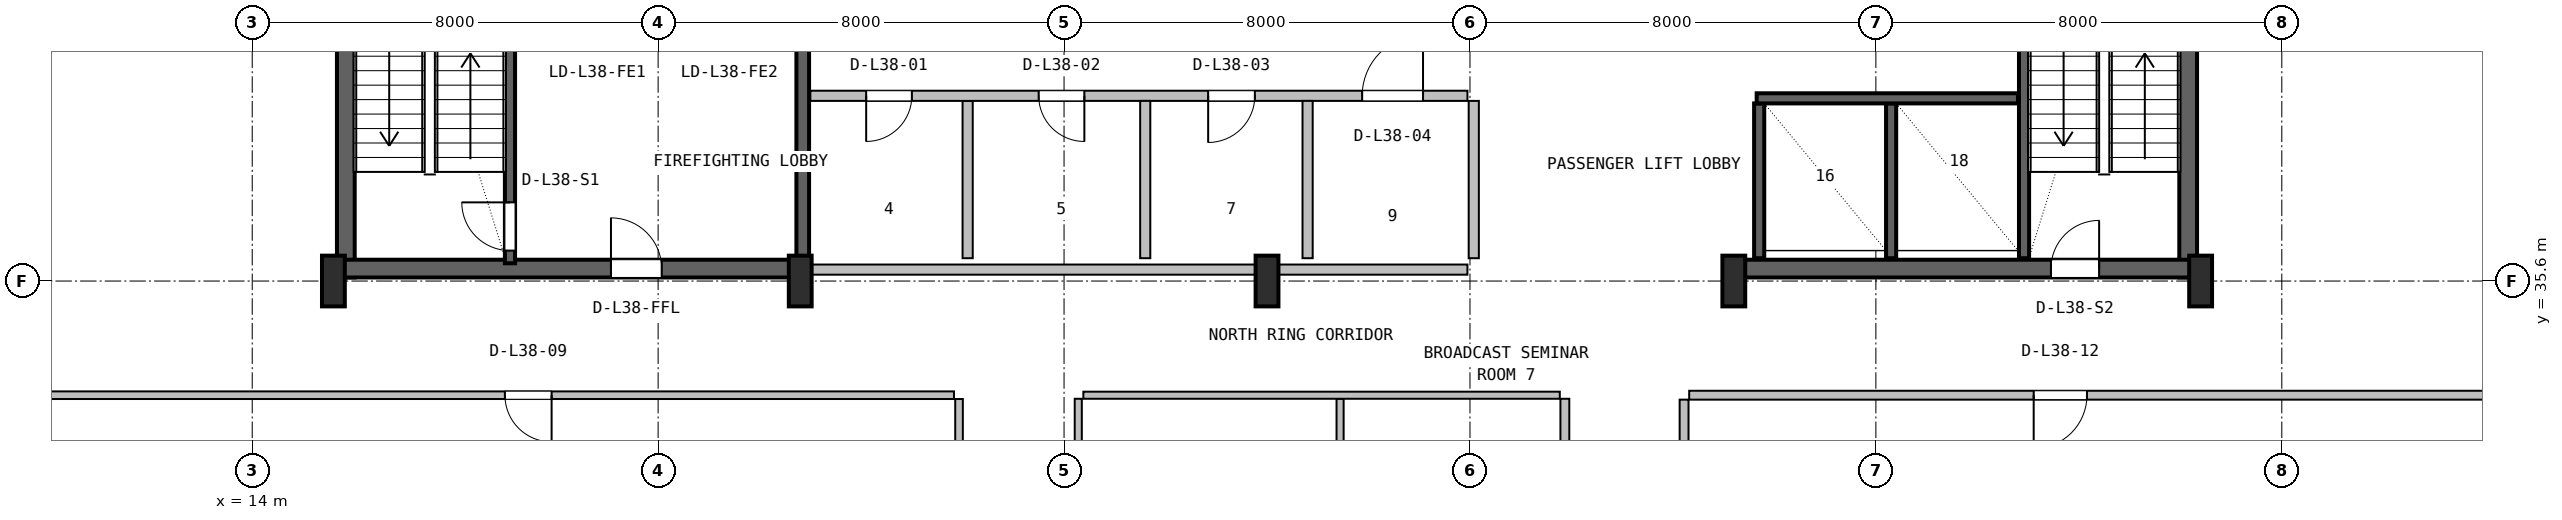
"""IFC4 building model, lengths in metres.
Left out: names, types, materials, properties, quantities, classifications, styles, units other than length and angle.
Written with IfcOpenShell. Run it as: python <this file> out.ifc"""

import sys

from ifc_helpers import new_model, si_unit, direction, frame, frame_2d, origin, origin_2d, place, context, subcontext, project, spatial, rectangle, i_section, extrude, source, transform, mapped, element, fill, save


model = new_model("IFC4")
c1 = context("Model", 3, precision=1e-05, world=origin(), true_north=direction((0.0, 1.0)))
c2 = subcontext(c1, "Body", "Model", "MODEL_VIEW")
j1 = project(units=[si_unit("LENGTHUNIT", "METRE"), si_unit("PLANEANGLEUNIT", "RADIAN")], contexts=[c1])
p1 = place(None, origin())
s1 = spatial("IfcSite", under=j1, at=p1, CompositionType="ELEMENT")
p2 = place(p1, origin())
s2 = spatial("IfcBuilding", under=s1, at=p2, CompositionType="ELEMENT")
p3 = place(p2, frame((0.0, 0.0, 157.2)))
s3 = spatial("IfcBuildingStorey", under=s2, at=p3, CompositionType="ELEMENT", Elevation=157.2)
for number, where, z_axis, x_axis in (
    (1, (15.845, 35.67, 0.0), (0.0, 0.0, 1.0), (0.0, 1.0, 0.0)),
    (2, (52.155, 35.67, 0.0), (0.0, 0.0, 1.0), (0.0, 1.0, 0.0)),
):
    element("IfcWall", number, at=place(p3, frame(where, z_axis=z_axis, x_axis=x_axis)), inside=s3, PredefinedType="SHEAR", context=c2, shape_type="SweptSolid", body=[
        extrude(rectangle(XDim=11.13, YDim=0.35, at=frame_2d((5.565, 0.0))), origin(), (0.0, 0.0, 1.0), 3.55),
    ])
p4 = place(p3, frame((15.67, 35.845, 0.0), z_axis=(0.0, 0.0, 1.0), x_axis=(1.0, 0.0, 0.0)))
e3 = element("IfcWall", 3, at=p4, inside=s3, PredefinedType="SHEAR", context=c2, shape_type="SweptSolid", body=[
    extrude(rectangle(XDim=9.13, YDim=0.35, at=frame_2d((4.565, 0.0))), origin(), (0.0, 0.0, 1.0), 3.55),
])
p5 = place(p4, frame((5.4, 0.0, 0.0)))
e4 = element("IfcOpeningElement", 4, at=p5, cuts=e3, PredefinedType="OPENING", context=c2, shape_type="SweptSolid", body=[
    extrude(rectangle(XDim=1.0, YDim=2.1, at=frame_2d((0.5, 1.05))), frame((0.0, 0.185, 0.0), z_axis=(0.0, -1.0, 0.0), x_axis=(1.0, 0.0, 0.0)), (0.0, 0.0, 1.0), 0.37),
])
p6 = place(p3, frame((43.2, 35.845, 0.0), z_axis=(0.0, 0.0, 1.0), x_axis=(1.0, 0.0, 0.0)))
e5 = element("IfcWall", 5, at=p6, inside=s3, PredefinedType="SHEAR", context=c2, shape_type="SweptSolid", body=[
    extrude(rectangle(XDim=9.13, YDim=0.35, at=frame_2d((4.565, 0.0))), origin(), (0.0, 0.0, 1.0), 3.55),
])
p7 = place(p6, frame((6.25, 0.0, 0.0)))
e6 = element("IfcOpeningElement", 6, at=p7, cuts=e5, PredefinedType="OPENING", context=c2, shape_type="SweptSolid", body=[
    extrude(rectangle(XDim=0.95, YDim=2.1, at=frame_2d((0.475, 1.05))), frame((0.0, 0.185, 0.0), z_axis=(0.0, -1.0, 0.0), x_axis=(1.0, 0.0, 0.0)), (0.0, 0.0, 1.0), 0.37),
])
m1 = source(origin(), c2, "Body", "SweptSolid", [
    extrude(i_section(OverallWidth=0.45, OverallDepth=1.0, WebThickness=0.016, FlangeThickness=0.03, FilletRadius=0.016, at=origin_2d()), origin(), (0.0, 0.0, 1.0), 3.8),
])
for number, where, z_axis, x_axis in (
    (7, (15.6, 35.6, 0.0), (0.0, 0.0, 1.0), (1.0, 0.0, 0.0)),
    (8, (24.8, 35.6, 0.0), (0.0, 0.0, 1.0), (1.0, 0.0, 0.0)),
    (9, (34.0, 35.6, 0.0), (0.0, 0.0, 1.0), (1.0, 0.0, 0.0)),
    (10, (43.2, 35.6, 0.0), (0.0, 0.0, 1.0), (1.0, 0.0, 0.0)),
    (11, (52.4, 35.6, 0.0), (0.0, 0.0, 1.0), (1.0, 0.0, 0.0)),
):
    element("IfcColumn", number, at=place(p3, frame(where, z_axis=z_axis, x_axis=x_axis)), inside=s3, PredefinedType="COLUMN", context=c2, shape_type="MappedRepresentation", body=[
        mapped(m1, transform((0.0, 0.0, 0.0), x_axis=(1.0, 0.0, 0.0), y_axis=(0.0, 1.0, 0.0), z_axis=(0.0, 0.0, 1.0), scale=1.0)),
    ])
p8 = place(p3, frame((19.08, 35.95, 0.0), z_axis=(0.0, 0.0, 1.0), x_axis=(0.0, 1.0, 0.0)))
e12 = element("IfcWall", 12, at=p8, inside=s3, PredefinedType="SHEAR", context=c2, shape_type="SweptSolid", body=[
    extrude(rectangle(XDim=9.65, YDim=0.2, at=frame_2d((4.825, 0.0))), origin(), (0.0, 0.0, 1.0), 3.55),
])
p9 = place(p8, frame((0.25, 0.0, 0.0)))
e13 = element("IfcOpeningElement", 13, at=p9, cuts=e12, PredefinedType="OPENING", context=c2, shape_type="SweptSolid", body=[
    extrude(rectangle(XDim=0.95, YDim=2.1, at=frame_2d((0.475, 1.05))), frame((0.0, 0.11, 0.0), z_axis=(0.0, -1.0, 0.0), x_axis=(1.0, 0.0, 0.0)), (0.0, 0.0, 1.0), 0.22),
])
p10 = place(p3, frame((24.85, 36.05, 0.0), z_axis=(0.0, 0.0, 1.0), x_axis=(0.0, 1.0, 0.0)))
e14 = element("IfcWall", 14, at=p10, inside=s3, PredefinedType="SHEAR", context=c2, shape_type="SweptSolid", body=[
    extrude(rectangle(XDim=10.45, YDim=0.25, at=frame_2d((5.225, 0.0))), origin(), (0.0, 0.0, 1.0), 3.55),
])
p11 = place(p3, frame((48.92, 36.05, 0.0), z_axis=(0.0, 0.0, 1.0), x_axis=(0.0, 1.0, 0.0)))
e15 = element("IfcWall", 15, at=p11, inside=s3, PredefinedType="SHEAR", context=c2, shape_type="SweptSolid", body=[
    extrude(rectangle(XDim=10.5, YDim=0.2, at=frame_2d((5.25, 0.0))), origin(), (0.0, 0.0, 1.0), 3.55),
])
for number, where, z_axis, x_axis in (
    (16, (43.7, 36.05, 0.0), (0.0, 0.0, 1.0), (0.0, 1.0, 0.0)),
    (17, (46.3, 36.05, 0.0), (0.0, 0.0, 1.0), (0.0, 1.0, 0.0)),
):
    element("IfcWall", number, at=place(p3, frame(where, z_axis=z_axis, x_axis=x_axis)), inside=s3, PredefinedType="SHEAR", context=c2, shape_type="SweptSolid", body=[
        extrude(rectangle(XDim=3.05, YDim=0.2, at=frame_2d((1.525, 0.0))), origin(), (0.0, 0.0, 1.0), 3.55),
    ])
p12 = place(p3, frame((43.65, 39.2, 0.0), z_axis=(0.0, 0.0, 1.0), x_axis=(1.0, 0.0, 0.0)))
e18 = element("IfcWall", 18, at=p12, inside=s3, PredefinedType="SHEAR", context=c2, shape_type="SweptSolid", body=[
    extrude(rectangle(XDim=5.15, YDim=0.2, at=frame_2d((2.575, 0.0))), origin(), (0.0, 0.0, 1.0), 3.55),
])
p13 = place(p3, frame((25.0, 35.825, 0.0), z_axis=(0.0, 0.0, 1.0), x_axis=(1.0, 0.0, 0.0)))
e19 = element("IfcWall", 19, at=p13, inside=s3, PredefinedType="SOLIDWALL", context=c2, shape_type="SweptSolid", body=[
    extrude(rectangle(XDim=12.95, YDim=0.2, at=frame_2d((6.475, 0.0))), origin(), (0.0, 0.0, 1.0), 2.575),
])
p14 = place(p3, frame((28.1, 36.05, 0.0), z_axis=(0.0, 0.0, 1.0), x_axis=(0.0, 1.0, 0.0)))
e20 = element("IfcWall", 20, at=p14, inside=s3, PredefinedType="PLUMBINGWALL", context=c2, shape_type="SweptSolid", body=[
    extrude(rectangle(XDim=3.1, YDim=0.2, at=frame_2d((1.55, 0.0))), origin(), (0.0, 0.0, 1.0), 3.53),
])
p15 = place(p3, frame((25.0, 39.25, 0.0), z_axis=(0.0, 0.0, 1.0), x_axis=(1.0, 0.0, 0.0)))
e21 = element("IfcWall", 21, at=p15, inside=s3, PredefinedType="SOLIDWALL", context=c2, shape_type="SweptSolid", body=[
    extrude(rectangle(XDim=12.95, YDim=0.2, at=frame_2d((6.475, 0.0))), origin(), (0.0, 0.0, 1.0), 3.53),
])
p16 = place(p15, frame((1.1, 0.0, 0.0)))
e22 = element("IfcOpeningElement", 22, at=p16, cuts=e21, PredefinedType="OPENING", context=c2, shape_type="SweptSolid", body=[
    extrude(rectangle(XDim=0.9, YDim=2.06, at=frame_2d((0.45, 1.03))), frame((0.0, 0.11, 0.0), z_axis=(0.0, -1.0, 0.0), x_axis=(1.0, 0.0, 0.0)), (0.0, 0.0, 1.0), 0.22),
])
p17 = place(p15, frame((4.5, 0.0, 0.0)))
e23 = element("IfcOpeningElement", 23, at=p17, cuts=e21, PredefinedType="OPENING", context=c2, shape_type="SweptSolid", body=[
    extrude(rectangle(XDim=0.9, YDim=2.06, at=frame_2d((0.45, 1.03))), frame((0.0, 0.11, 0.0), z_axis=(0.0, -1.0, 0.0), x_axis=(1.0, 0.0, 0.0)), (0.0, 0.0, 1.0), 0.22),
])
p18 = place(p15, frame((7.84, 0.0, 0.0)))
e24 = element("IfcOpeningElement", 24, at=p18, cuts=e21, PredefinedType="OPENING", context=c2, shape_type="SweptSolid", body=[
    extrude(rectangle(XDim=0.92, YDim=2.08, at=frame_2d((0.46, 1.04))), frame((0.0, 0.11, 0.0), z_axis=(0.0, -1.0, 0.0), x_axis=(1.0, 0.0, 0.0)), (0.0, 0.0, 1.0), 0.22),
])
p19 = place(p15, frame((10.875, 0.0, 0.0)))
e25 = element("IfcOpeningElement", 25, at=p19, cuts=e21, PredefinedType="OPENING", context=c2, shape_type="SweptSolid", body=[
    extrude(rectangle(XDim=1.2, YDim=2.1, at=frame_2d((0.6, 1.05))), frame((0.0, 0.11, 0.0), z_axis=(0.0, -1.0, 0.0), x_axis=(1.0, 0.0, 0.0)), (0.0, 0.0, 1.0), 0.22),
])
p20 = place(p3, frame((31.6, 36.05, 0.0), z_axis=(0.0, 0.0, 1.0), x_axis=(0.0, 1.0, 0.0)))
e26 = element("IfcWall", 26, at=p20, inside=s3, PredefinedType="PLUMBINGWALL", context=c2, shape_type="SweptSolid", body=[
    extrude(rectangle(XDim=3.1, YDim=0.2, at=frame_2d((1.55, 0.0))), origin(), (0.0, 0.0, 1.0), 3.53),
])
for number, where, z_axis, x_axis in (
    (27, (34.8, 36.05, 0.0), (0.0, 0.0, 1.0), (0.0, 1.0, 0.0)),
    (28, (38.075, 36.05, 0.0), (0.0, 0.0, 1.0), (0.0, 1.0, 0.0)),
):
    element("IfcWall", number, at=place(p3, frame(where, z_axis=z_axis, x_axis=x_axis)), inside=s3, PredefinedType="SOLIDWALL", context=c2, shape_type="SweptSolid", body=[
        extrude(rectangle(XDim=3.1, YDim=0.2, at=frame_2d((1.55, 0.0))), origin(), (0.0, 0.0, 1.0), 3.53),
    ])
p21 = place(p3, frame((27.93, 26.647, 0.0), z_axis=(0.0, 0.0, 1.0), x_axis=(0.0, 1.0, 0.0)))
e29 = element("IfcWall", 29, at=p21, inside=s3, PredefinedType="PARTITIONING", context=c2, shape_type="SweptSolid", body=[
    extrude(rectangle(XDim=6.628, YDim=0.15, at=frame_2d((3.314, 0.0))), origin(), (0.0, 0.0, 1.0), 3.222),
])
p22 = place(p3, frame((7.18, 33.35, 0.0), z_axis=(0.0, 0.0, 1.0), x_axis=(1.0, 0.0, 0.0)))
e30 = element("IfcWall", 30, at=p22, inside=s3, PredefinedType="PARTITIONING", context=c2, shape_type="SweptSolid", body=[
    extrude(rectangle(XDim=20.65, YDim=0.15, at=frame_2d((10.325, 0.0))), origin(), (0.0, 0.0, 1.0), 2.909),
])
p23 = place(p22, frame((11.8, 0.0, 0.0)))
e31 = element("IfcOpeningElement", 31, at=p23, cuts=e30, PredefinedType="OPENING", context=c2, shape_type="SweptSolid", body=[
    extrude(rectangle(XDim=0.92, YDim=2.08, at=frame_2d((0.46, 1.04))), frame((0.0, 0.085, 0.0), z_axis=(0.0, -1.0, 0.0), x_axis=(1.0, 0.0, 0.0)), (0.0, 0.0, 1.0), 0.17),
])
p24 = place(p3, frame((35.44, 28.98, 0.0), z_axis=(0.0, 0.0, 1.0), x_axis=(0.0, 1.0, 0.0)))
e32 = element("IfcWall", 32, at=p24, inside=s3, PredefinedType="PARTITIONING", context=c2, shape_type="SweptSolid", body=[
    extrude(rectangle(XDim=4.3, YDim=0.14, at=frame_2d((2.15, 0.0))), origin(), (0.0, 0.0, 1.0), 3.222),
])
p25 = place(p3, frame((30.38, 33.35, 0.0), z_axis=(0.0, 0.0, 1.0), x_axis=(1.0, 0.0, 0.0)))
e33 = element("IfcWall", 33, at=p25, inside=s3, PredefinedType="PARTITIONING", context=c2, shape_type="SweptSolid", body=[
    extrude(rectangle(XDim=9.39, YDim=0.14, at=frame_2d((4.695, 0.0))), origin(), (0.0, 0.0, 1.0), 2.909),
])
p26 = place(p3, frame((30.28, 28.98, 0.0), z_axis=(0.0, 0.0, 1.0), x_axis=(0.0, 1.0, 0.0)))
e34 = element("IfcWall", 34, at=p26, inside=s3, PredefinedType="PARTITIONING", context=c2, shape_type="SweptSolid", body=[
    extrude(rectangle(XDim=4.3, YDim=0.14, at=frame_2d((2.15, 0.0))), origin(), (0.0, 0.0, 1.0), 3.222),
])
p27 = place(p3, frame((39.87, 28.98, 0.0), z_axis=(0.0, 0.0, 1.0), x_axis=(0.0, 1.0, 0.0)))
e35 = element("IfcWall", 35, at=p27, inside=s3, PredefinedType="PARTITIONING", context=c2, shape_type="SweptSolid", body=[
    extrude(rectangle(XDim=4.3, YDim=0.175, at=frame_2d((2.15, 0.0))), origin(), (0.0, 0.0, 1.0), 3.222),
])
p28 = place(p27, frame((1.625, 0.0, 0.0)))
e36 = element("IfcOpeningElement", 36, at=p28, cuts=e35, PredefinedType="OPENING", context=c2, shape_type="SweptSolid", body=[
    extrude(rectangle(XDim=1.05, YDim=2.1, at=frame_2d((0.525, 1.05))), frame((0.0, 0.098, 0.0), z_axis=(0.0, -1.0, 0.0), x_axis=(1.0, 0.0, 0.0)), (0.0, 0.0, 1.0), 0.195),
])
p29 = place(p3, frame((42.32, 33.35, 0.0), z_axis=(0.0, 0.0, 1.0), x_axis=(1.0, 0.0, 0.0)))
e37 = element("IfcWall", 37, at=p29, inside=s3, PredefinedType="PARTITIONING", context=c2, shape_type="SweptSolid", body=[
    extrude(rectangle(XDim=18.5, YDim=0.175, at=frame_2d((9.25, 0.0))), origin(), (0.0, 0.0, 1.0), 2.909),
])
p30 = place(p29, frame((6.79, 0.0, 0.0)))
e38 = element("IfcOpeningElement", 38, at=p30, cuts=e37, PredefinedType="OPENING", context=c2, shape_type="SweptSolid", body=[
    extrude(rectangle(XDim=1.05, YDim=2.1, at=frame_2d((0.525, 1.05))), frame((0.0, 0.098, 0.0), z_axis=(0.0, -1.0, 0.0), x_axis=(1.0, 0.0, 0.0)), (0.0, 0.0, 1.0), 0.195),
])
p31 = place(p3, frame((42.22, 26.647, 0.0), z_axis=(0.0, 0.0, 1.0), x_axis=(0.0, 1.0, 0.0)))
e39 = element("IfcWall", 39, at=p31, inside=s3, PredefinedType="PARTITIONING", context=c2, shape_type="SweptSolid", body=[
    extrude(rectangle(XDim=6.616, YDim=0.175, at=frame_2d((3.308, 0.0))), origin(), (0.0, 0.0, 1.0), 3.222),
])
m2 = source(origin(), c2, "Body", "SweptSolid", [
    extrude(rectangle(XDim=0.95, YDim=2.1, at=frame_2d((0.475, 1.05))), frame((0.0, 0.025, 0.0), z_axis=(0.0, -1.0, 0.0), x_axis=(1.0, 0.0, 0.0)), (0.0, 0.0, 1.0), 0.05),
])
p32 = place(p9, origin())
e40 = element("IfcDoor", 40, at=p32, inside=s3, OperationType="SINGLE_SWING_RIGHT", PredefinedType="DOOR", context=c2, shape_type="MappedRepresentation", body=[
    mapped(m2, transform((0.0, 0.0, 0.0), x_axis=(1.0, 0.0, 0.0), y_axis=(0.0, 1.0, 0.0), z_axis=(0.0, 0.0, 1.0), scale=1.0)),
])
fill(e13, e40)
m3 = source(origin(), c2, "Body", "SweptSolid", [
    extrude(rectangle(XDim=1.0, YDim=2.1, at=frame_2d((0.5, 1.05))), frame((0.0, 0.025, 0.0), z_axis=(0.0, -1.0, 0.0), x_axis=(1.0, 0.0, 0.0)), (0.0, 0.0, 1.0), 0.05),
])
p33 = place(p5, origin())
e41 = element("IfcDoor", 41, at=p33, inside=s3, OperationType="SINGLE_SWING_LEFT", PredefinedType="DOOR", context=c2, shape_type="MappedRepresentation", body=[
    mapped(m3, transform((0.0, 0.0, 0.0), x_axis=(1.0, 0.0, 0.0), y_axis=(0.0, 1.0, 0.0), z_axis=(0.0, 0.0, 1.0), scale=1.0)),
])
fill(e4, e41)
p34 = place(p7, origin())
e42 = element("IfcDoor", 42, at=p34, inside=s3, OperationType="SINGLE_SWING_RIGHT", PredefinedType="DOOR", context=c2, shape_type="MappedRepresentation", body=[
    mapped(m2, transform((0.0, 0.0, 0.0), x_axis=(1.0, 0.0, 0.0), y_axis=(0.0, 1.0, 0.0), z_axis=(0.0, 0.0, 1.0), scale=1.0)),
])
fill(e6, e42)
m4 = source(origin(), c2, "Body", "SweptSolid", [
    extrude(rectangle(XDim=0.9, YDim=2.06, at=frame_2d((0.45, 1.03))), frame((0.0, 0.025, 0.0), z_axis=(0.0, -1.0, 0.0), x_axis=(1.0, 0.0, 0.0)), (0.0, 0.0, 1.0), 0.05),
])
p35 = place(p16, frame((0.9, 0.0, 0.0), z_axis=(0.0, 0.0, 1.0), x_axis=(-1.0, 0.0, 0.0)))
e43 = element("IfcDoor", 43, at=p35, inside=s3, OperationType="SINGLE_SWING_LEFT", PredefinedType="DOOR", context=c2, shape_type="MappedRepresentation", body=[
    mapped(m4, transform((0.0, 0.0, 0.0), x_axis=(1.0, 0.0, 0.0), y_axis=(0.0, 1.0, 0.0), z_axis=(0.0, 0.0, 1.0), scale=1.0)),
])
fill(e22, e43)
p36 = place(p17, frame((0.9, 0.0, 0.0), z_axis=(0.0, 0.0, 1.0), x_axis=(-1.0, 0.0, 0.0)))
e44 = element("IfcDoor", 44, at=p36, inside=s3, OperationType="SINGLE_SWING_RIGHT", PredefinedType="DOOR", context=c2, shape_type="MappedRepresentation", body=[
    mapped(m4, transform((0.0, 0.0, 0.0), x_axis=(1.0, 0.0, 0.0), y_axis=(0.0, 1.0, 0.0), z_axis=(0.0, 0.0, 1.0), scale=1.0)),
])
fill(e23, e44)
m5 = source(origin(), c2, "Body", "SweptSolid", [
    extrude(rectangle(XDim=0.92, YDim=2.08, at=frame_2d((0.46, 1.04))), frame((0.0, 0.025, 0.0), z_axis=(0.0, -1.0, 0.0), x_axis=(1.0, 0.0, 0.0)), (0.0, 0.0, 1.0), 0.05),
])
p37 = place(p18, frame((0.92, 0.0, 0.0), z_axis=(0.0, 0.0, 1.0), x_axis=(-1.0, 0.0, 0.0)))
e45 = element("IfcDoor", 45, at=p37, inside=s3, OperationType="SINGLE_SWING_LEFT", PredefinedType="DOOR", context=c2, shape_type="MappedRepresentation", body=[
    mapped(m5, transform((0.0, 0.0, 0.0), x_axis=(1.0, 0.0, 0.0), y_axis=(0.0, 1.0, 0.0), z_axis=(0.0, 0.0, 1.0), scale=1.0)),
])
fill(e24, e45)
m6 = source(origin(), c2, "Body", "SweptSolid", [
    extrude(rectangle(XDim=1.2, YDim=2.1, at=frame_2d((0.6, 1.05))), frame((0.0, 0.025, 0.0), z_axis=(0.0, -1.0, 0.0), x_axis=(1.0, 0.0, 0.0)), (0.0, 0.0, 1.0), 0.05),
])
p38 = place(p19, origin())
e46 = element("IfcDoor", 46, at=p38, inside=s3, OperationType="SINGLE_SWING_RIGHT", PredefinedType="DOOR", context=c2, shape_type="MappedRepresentation", body=[
    mapped(m6, transform((0.0, 0.0, 0.0), x_axis=(1.0, 0.0, 0.0), y_axis=(0.0, 1.0, 0.0), z_axis=(0.0, 0.0, 1.0), scale=1.0)),
])
fill(e25, e46)
p39 = place(p23, frame((0.92, 0.0, 0.0), z_axis=(0.0, 0.0, 1.0), x_axis=(-1.0, 0.0, 0.0)))
e47 = element("IfcDoor", 47, at=p39, inside=s3, OperationType="SINGLE_SWING_RIGHT", PredefinedType="DOOR", context=c2, shape_type="MappedRepresentation", body=[
    mapped(m5, transform((0.0, 0.0, 0.0), x_axis=(1.0, 0.0, 0.0), y_axis=(0.0, 1.0, 0.0), z_axis=(0.0, 0.0, 1.0), scale=1.0)),
])
fill(e31, e47)
m7 = source(origin(), c2, "Body", "SweptSolid", [
    extrude(rectangle(XDim=1.05, YDim=2.1, at=frame_2d((0.525, 1.05))), frame((0.0, 0.025, 0.0), z_axis=(0.0, -1.0, 0.0), x_axis=(1.0, 0.0, 0.0)), (0.0, 0.0, 1.0), 0.05),
])
p40 = place(p30, frame((1.05, 0.0, 0.0), z_axis=(0.0, 0.0, 1.0), x_axis=(-1.0, 0.0, 0.0)))
e48 = element("IfcDoor", 48, at=p40, inside=s3, OperationType="SINGLE_SWING_LEFT", PredefinedType="DOOR", context=c2, shape_type="MappedRepresentation", body=[
    mapped(m7, transform((0.0, 0.0, 0.0), x_axis=(1.0, 0.0, 0.0), y_axis=(0.0, 1.0, 0.0), z_axis=(0.0, 0.0, 1.0), scale=1.0)),
])
fill(e38, e48)
save(model, sys.argv[1])
